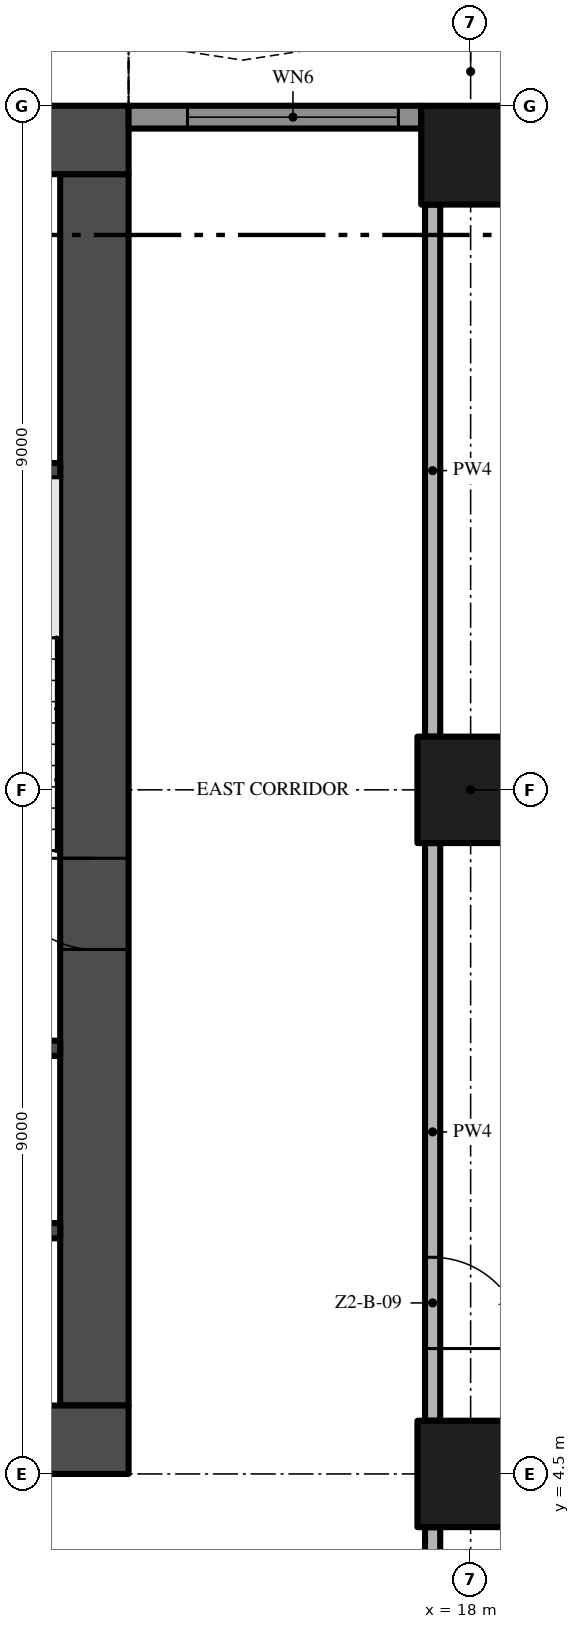
"""IFC4 building model, lengths in metres.
Left out: names, types, materials, properties, quantities, classifications, styles, units other than length and angle.
Written with IfcOpenShell. Run it as: python <this file> out.ifc"""

import sys

from ifc_helpers import new_model, si_unit, direction, frame, frame_2d, origin, origin_2d, place, context, subcontext, project, spatial, polyline, rectangle, outline, extrude, element, fill, save


model = new_model("IFC4")
c1 = context("Model", 3, precision=1e-05, world=origin(), true_north=direction((0.0, 1.0)))
c2 = subcontext(c1, "Body", "Model", "MODEL_VIEW")
j1 = project(units=[si_unit("LENGTHUNIT", "METRE"), si_unit("PLANEANGLEUNIT", "RADIAN")], contexts=[c1])
p1 = place(None, origin())
s1 = spatial("IfcSite", under=j1, at=p1, CompositionType="ELEMENT")
p2 = place(p1, origin())
s2 = spatial("IfcBuilding", under=s1, at=p2, CompositionType="ELEMENT")
p3 = place(p2, frame((0.0, 0.0, 84.6)))
s3 = spatial("IfcBuildingStorey", under=s2, at=p3, CompositionType="ELEMENT", Elevation=84.6)
p4 = place(p3, frame((-13.5, 4.95, -0.3), z_axis=(0.0, 0.0, 1.0), x_axis=(1.0, 0.0, 0.0)))
e1 = element("IfcWall", 1, at=p4, inside=s3, PredefinedType="SHEAR", context=c2, shape_type="SweptSolid", body=[
    extrude(rectangle(XDim=27.0, YDim=0.9, at=frame_2d((13.5, 0.0))), origin(), (0.0, 0.0, 1.0), 3.8),
])
p5 = place(p4, frame((12.0, 0.0, 0.3)))
e2 = element("IfcOpeningElement", 2, at=p5, cuts=e1, PredefinedType="OPENING", context=c2, shape_type="SweptSolid", body=[
    extrude(rectangle(XDim=3.0, YDim=2.4, at=frame_2d((1.5, 1.2))), frame((0.0, 0.46, 0.0), z_axis=(0.0, -1.0, 0.0), x_axis=(1.0, 0.0, 0.0)), (0.0, 0.0, 1.0), 0.92),
])
p6 = place(p4, frame((4.9, 0.0, 0.3)))
e3 = element("IfcOpeningElement", 3, at=p6, cuts=e1, PredefinedType="OPENING", context=c2, shape_type="SweptSolid", body=[
    extrude(rectangle(XDim=1.2, YDim=2.2, at=frame_2d((0.6, 1.1))), frame((0.0, 0.46, 0.0), z_axis=(0.0, -1.0, 0.0), x_axis=(1.0, 0.0, 0.0)), (0.0, 0.0, 1.0), 0.92),
])
p7 = place(p4, frame((20.75, 0.0, 0.3)))
e4 = element("IfcOpeningElement", 4, at=p7, cuts=e1, PredefinedType="OPENING", context=c2, shape_type="SweptSolid", body=[
    extrude(rectangle(XDim=1.5, YDim=2.2, at=frame_2d((0.75, 1.1))), frame((0.0, 0.46, 0.0), z_axis=(0.0, -1.0, 0.0), x_axis=(1.0, 0.0, 0.0)), (0.0, 0.0, 1.0), 0.92),
])
p8 = place(p4, frame((17.4, 0.0, 0.3)))
e5 = element("IfcOpeningElement", 5, at=p8, cuts=e1, PredefinedType="OPENING", context=c2, shape_type="SweptSolid", body=[
    extrude(rectangle(XDim=1.2, YDim=2.2, at=frame_2d((0.6, 1.1))), frame((0.0, 0.46, 0.0), z_axis=(0.0, -1.0, 0.0), x_axis=(1.0, 0.0, 0.0)), (0.0, 0.0, 1.0), 0.92),
])
p9 = place(p3, frame((13.05, 5.4, -0.3), z_axis=(0.0, 0.0, 1.0), x_axis=(0.0, 1.0, 0.0)))
e6 = element("IfcWall", 6, at=p9, inside=s3, PredefinedType="SHEAR", context=c2, shape_type="SweptSolid", body=[
    extrude(rectangle(XDim=16.2, YDim=0.9, at=frame_2d((8.1, 0.0))), origin(), (0.0, 0.0, 1.0), 3.8),
])
p10 = place(p9, frame((6.0, 0.0, 0.3)))
e7 = element("IfcOpeningElement", 7, at=p10, cuts=e6, PredefinedType="OPENING", context=c2, shape_type="SweptSolid", body=[
    extrude(rectangle(XDim=1.2, YDim=2.2, at=frame_2d((0.6, 1.1))), frame((0.0, 0.46, 0.0), z_axis=(0.0, -1.0, 0.0), x_axis=(1.0, 0.0, 0.0)), (0.0, 0.0, 1.0), 0.92),
])
p11 = place(p3, frame((13.5, 22.05, -0.3), z_axis=(0.0, 0.0, 1.0), x_axis=(-1.0, 0.0, 0.0)))
e8 = element("IfcWall", 8, at=p11, inside=s3, PredefinedType="SHEAR", context=c2, shape_type="SweptSolid", body=[
    extrude(rectangle(XDim=27.0, YDim=0.9, at=frame_2d((13.5, 0.0))), origin(), (0.0, 0.0, 1.0), 3.8),
])
p12 = place(p3, frame((18.0, 13.5, 0.0), z_axis=(0.0, 0.0, 1.0), x_axis=(1.0, 0.0, 0.0)))
e9 = element("IfcColumn", 9, at=p12, inside=s3, PredefinedType="COLUMN", context=c2, shape_type="SweptSolid", body=[
    extrude(rectangle(XDim=1.4, YDim=1.4, at=origin_2d()), origin(), (0.0, 0.0, 1.0), 3.5),
])
p13 = place(p3, frame((18.0, 21.85, 0.0), z_axis=(0.0, 0.0, 1.0), x_axis=(1.0, 0.0, 0.0)))
e10 = element("IfcColumn", 10, at=p13, inside=s3, PredefinedType="COLUMN", context=c2, shape_type="SweptSolid", body=[
    extrude(rectangle(XDim=1.3, YDim=1.3, at=origin_2d()), origin(), (0.0, 0.0, 1.0), 3.5),
])
p14 = place(p3, frame((18.0, 4.5, 0.0), z_axis=(0.0, 0.0, 1.0), x_axis=(1.0, 0.0, 0.0)))
e11 = element("IfcColumn", 11, at=p14, inside=s3, PredefinedType="COLUMN", context=c2, shape_type="SweptSolid", body=[
    extrude(rectangle(XDim=1.4, YDim=1.4, at=origin_2d()), origin(), (0.0, 0.0, 1.0), 3.5),
])
p15 = place(p3, frame((13.5, 22.35, 0.0), z_axis=(0.0, 0.0, 1.0), x_axis=(1.0, 0.0, 0.0)))
e12 = element("IfcWall", 12, at=p15, inside=s3, PredefinedType="SOLIDWALL", context=c2, shape_type="SweptSolid", body=[
    extrude(rectangle(XDim=3.85, YDim=0.3, at=frame_2d((1.925, 0.0))), origin(), (0.0, 0.0, 1.0), 3.5),
])
p16 = place(p15, frame((0.775, 0.0, 0.45)))
e13 = element("IfcOpeningElement", 13, at=p16, cuts=e12, PredefinedType="OPENING", context=c2, shape_type="SweptSolid", body=[
    extrude(rectangle(XDim=2.775, YDim=2.65, at=frame_2d((1.387, 1.325))), frame((0.0, 0.16, 0.0), z_axis=(0.0, -1.0, 0.0), x_axis=(1.0, 0.0, 0.0)), (0.0, 0.0, 1.0), 0.32),
])
p17 = place(p3, origin())
e14 = element("IfcWall", 14, at=p17, inside=s3, PredefinedType="USERDEFINED", context=c2, shape_type="SweptSolid", body=[
    extrude(outline(polyline([(22.5, 25.5), (21.0, 25.271), (19.5, 24.671), (18.0, 23.929), (16.5, 23.329), (15.0, 23.1), (13.5, 23.329), (13.462, 23.082), (15.0, 22.847), (16.566, 23.086), (18.102, 23.701), (19.602, 24.442), (21.066, 25.028), (22.538, 25.253), (22.5, 25.5)])), origin(), (0.0, 0.0, 1.0), 0.9),
])
for number, where, z_axis, x_axis in (
    (15, (9.65, 7.7, 0.0), (0.0, 0.0, 1.0), (1.0, 0.0, 0.0)),
    (16, (9.65, 10.1, 0.0), (0.0, 0.0, 1.0), (1.0, 0.0, 0.0)),
    (17, (9.65, 17.7, 0.0), (0.0, 0.0, 1.0), (1.0, 0.0, 0.0)),
):
    element("IfcWall", number, at=place(p3, frame(where, z_axis=z_axis, x_axis=x_axis)), inside=s3, PredefinedType="SHEAR", context=c2, shape_type="SweptSolid", body=[
        extrude(rectangle(XDim=2.95, YDim=0.2, at=frame_2d((1.475, 0.0))), origin(), (0.0, 0.0, 1.0), 3.5),
    ])
p18 = place(p3, frame((17.5, -0.2, 0.0), z_axis=(0.0, 0.0, 1.0), x_axis=(0.0, 1.0, 0.0)))
e18 = element("IfcWall", 18, at=p18, inside=s3, PredefinedType="PARTITIONING", context=c2, shape_type="SweptSolid", body=[
    extrude(rectangle(XDim=4.0, YDim=0.2, at=frame_2d((2.0, 0.0))), origin(), (0.0, 0.0, 1.0), 3.5),
])
p19 = place(p3, frame((17.5, 12.8, 0.0), z_axis=(0.0, 0.0, 1.0), x_axis=(0.0, -1.0, 0.0)))
e19 = element("IfcWall", 19, at=p19, inside=s3, PredefinedType="PARTITIONING", context=c2, shape_type="SweptSolid", body=[
    extrude(rectangle(XDim=7.6, YDim=0.2, at=frame_2d((3.8, 0.0))), origin(), (0.0, 0.0, 1.0), 3.5),
])
p20 = place(p19, frame((5.45, 0.0, 0.0)))
e20 = element("IfcOpeningElement", 20, at=p20, cuts=e19, PredefinedType="OPENING", context=c2, shape_type="SweptSolid", body=[
    extrude(rectangle(XDim=1.2, YDim=2.4, at=frame_2d((0.6, 1.2))), frame((0.0, 0.11, 0.0), z_axis=(0.0, -1.0, 0.0), x_axis=(1.0, 0.0, 0.0)), (0.0, 0.0, 1.0), 0.22),
])
p21 = place(p3, frame((17.5, 14.2, 0.0), z_axis=(0.0, 0.0, 1.0), x_axis=(0.0, 1.0, 0.0)))
e21 = element("IfcWall", 21, at=p21, inside=s3, PredefinedType="PARTITIONING", context=c2, shape_type="SweptSolid", body=[
    extrude(rectangle(XDim=7.0, YDim=0.2, at=frame_2d((3.5, 0.0))), origin(), (0.0, 0.0, 1.0), 3.5),
])
p22 = place(p16, origin())
e22 = element("IfcWindow", 22, at=p22, inside=s3, PartitioningType="SINGLE_PANEL", PredefinedType="WINDOW", context=c2, shape_type="SweptSolid", body=[
    extrude(rectangle(XDim=2.775, YDim=2.65, at=frame_2d((1.387, 1.325))), frame((0.0, 0.03, 0.0), z_axis=(0.0, -1.0, 0.0), x_axis=(1.0, 0.0, 0.0)), (0.0, 0.0, 1.0), 0.06),
])
fill(e13, e22)
p23 = place(p10, frame((1.2, 0.0, 0.0), z_axis=(0.0, 0.0, 1.0), x_axis=(-1.0, 0.0, 0.0)))
e23 = element("IfcDoor", 23, at=p23, inside=s3, OperationType="SINGLE_SWING_LEFT", PredefinedType="DOOR", context=c2, shape_type="SweptSolid", body=[
    extrude(rectangle(XDim=1.2, YDim=2.2, at=frame_2d((0.6, 1.1))), frame((0.0, 0.025, 0.0), z_axis=(0.0, -1.0, 0.0), x_axis=(1.0, 0.0, 0.0)), (0.0, 0.0, 1.0), 0.05),
])
fill(e7, e23)
p24 = place(p20, origin())
e24 = element("IfcDoor", 24, at=p24, inside=s3, OperationType="SINGLE_SWING_RIGHT", PredefinedType="DOOR", context=c2, shape_type="SweptSolid", body=[
    extrude(rectangle(XDim=1.2, YDim=2.4, at=frame_2d((0.6, 1.2))), frame((0.0, 0.025, 0.0), z_axis=(0.0, -1.0, 0.0), x_axis=(1.0, 0.0, 0.0)), (0.0, 0.0, 1.0), 0.05),
])
fill(e20, e24)
save(model, sys.argv[1])
